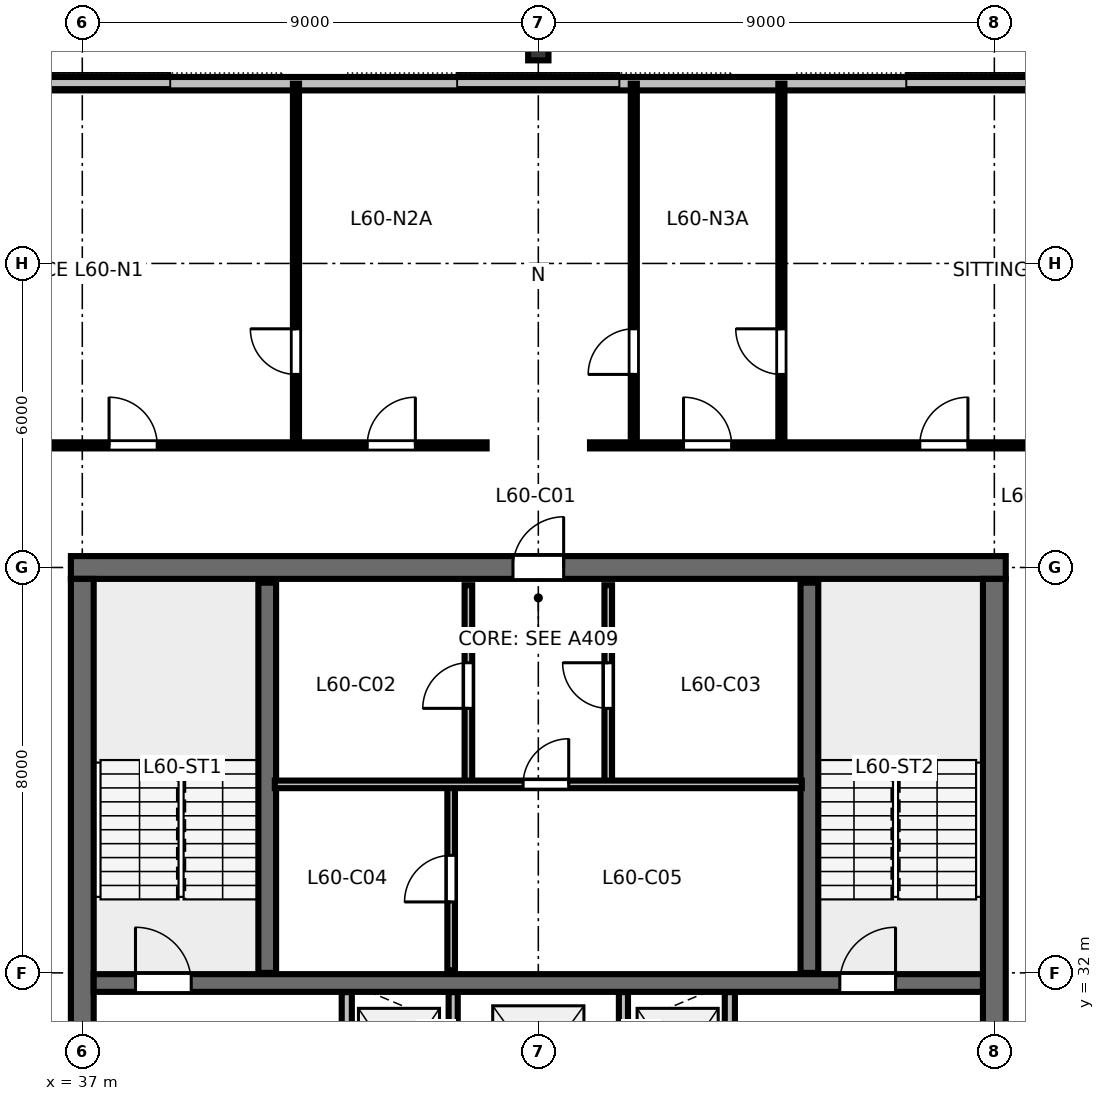
"""IFC4 building model, lengths in metres.
Left out: names, types, materials, properties, quantities, classifications, styles, units other than length and angle.
Written with IfcOpenShell. Run it as: python <this file> out.ifc"""

import sys

from ifc_helpers import new_model, si_unit, direction, frame, frame_2d, origin, origin_2d, place, context, subcontext, project, spatial, rectangle, i_section, extrude, element, fill, save


model = new_model("IFC4")
c1 = context("Model", 3, precision=1e-05, world=origin(), true_north=direction((0.0, 1.0)))
c2 = subcontext(c1, "Body", "Model", "MODEL_VIEW")
j1 = project(units=[si_unit("LENGTHUNIT", "METRE"), si_unit("PLANEANGLEUNIT", "RADIAN")], contexts=[c1])
p1 = place(None, origin())
s1 = spatial("IfcSite", under=j1, at=p1, CompositionType="ELEMENT")
p2 = place(p1, origin())
s2 = spatial("IfcBuilding", under=s1, at=p2, CompositionType="ELEMENT")
p3 = place(p2, frame((0.0, 0.0, 227.4)))
s3 = spatial("IfcBuildingStorey", under=s2, at=p3, CompositionType="ELEMENT", Elevation=227.4)
p4 = place(p3, frame((36.775, 40.0, 0.0), z_axis=(0.0, 0.0, 1.0), x_axis=(1.0, 0.0, 0.0)))
e1 = element("IfcWall", 1, at=p4, inside=s3, PredefinedType="SHEAR", context=c2, shape_type="SweptSolid", body=[
    extrude(rectangle(XDim=18.45, YDim=0.45, at=frame_2d((9.225, 0.0))), origin(), (0.0, 0.0, 1.0), 3.36),
])
p5 = place(p4, frame((8.725, 0.0, 0.0)))
e2 = element("IfcOpeningElement", 2, at=p5, cuts=e1, PredefinedType="OPENING", context=c2, shape_type="SweptSolid", body=[
    extrude(rectangle(XDim=1.0, YDim=2.15, at=frame_2d((0.5, 1.075))), frame((0.0, 0.235, 0.0), z_axis=(0.0, -1.0, 0.0), x_axis=(1.0, 0.0, 0.0)), (0.0, 0.0, 1.0), 0.47),
])
p6 = place(p3, frame((37.0, 24.225, 0.0), z_axis=(0.0, 0.0, 1.0), x_axis=(0.0, 1.0, 0.0)))
e3 = element("IfcWall", 3, at=p6, inside=s3, PredefinedType="SHEAR", context=c2, shape_type="SweptSolid", body=[
    extrude(rectangle(XDim=15.55, YDim=0.45, at=frame_2d((7.775, 0.0))), origin(), (0.0, 0.0, 1.0), 3.36),
])
p7 = place(p6, frame((5.3, 0.0, 0.0)))
e4 = element("IfcOpeningElement", 4, at=p7, cuts=e3, PredefinedType="OPENING", context=c2, shape_type="SweptSolid", body=[
    extrude(rectangle(XDim=1.15, YDim=2.15, at=frame_2d((0.575, 1.075))), frame((0.0, 0.235, 0.0), z_axis=(0.0, -1.0, 0.0), x_axis=(1.0, 0.0, 0.0)), (0.0, 0.0, 1.0), 0.47),
])
p8 = place(p3, frame((55.0, 24.225, 0.0), z_axis=(0.0, 0.0, 1.0), x_axis=(0.0, 1.0, 0.0)))
e5 = element("IfcWall", 5, at=p8, inside=s3, PredefinedType="SHEAR", context=c2, shape_type="SweptSolid", body=[
    extrude(rectangle(XDim=15.55, YDim=0.45, at=frame_2d((7.775, 0.0))), origin(), (0.0, 0.0, 1.0), 3.36),
])
p9 = place(p8, frame((5.3, 0.0, 0.0)))
e6 = element("IfcOpeningElement", 6, at=p9, cuts=e5, PredefinedType="OPENING", context=c2, shape_type="SweptSolid", body=[
    extrude(rectangle(XDim=1.15, YDim=2.15, at=frame_2d((0.575, 1.075))), frame((0.0, 0.235, 0.0), z_axis=(0.0, -1.0, 0.0), x_axis=(1.0, 0.0, 0.0)), (0.0, 0.0, 1.0), 0.47),
])
p10 = place(p3, frame((37.225, 31.8, 0.0), z_axis=(0.0, 0.0, 1.0), x_axis=(1.0, 0.0, 0.0)))
e7 = element("IfcWall", 7, at=p10, inside=s3, PredefinedType="SHEAR", context=c2, shape_type="SweptSolid", body=[
    extrude(rectangle(XDim=17.55, YDim=0.35, at=frame_2d((8.775, 0.0))), origin(), (0.0, 0.0, 1.0), 3.36),
])
p11 = place(p10, frame((0.825, 0.0, 0.0)))
e8 = element("IfcOpeningElement", 8, at=p11, cuts=e7, PredefinedType="OPENING", context=c2, shape_type="SweptSolid", body=[
    extrude(rectangle(XDim=1.1, YDim=2.15, at=frame_2d((0.55, 1.075))), frame((0.0, 0.185, 0.0), z_axis=(0.0, -1.0, 0.0), x_axis=(1.0, 0.0, 0.0)), (0.0, 0.0, 1.0), 0.37),
])
p12 = place(p10, frame((14.725, 0.0, 0.0)))
e9 = element("IfcOpeningElement", 9, at=p12, cuts=e7, PredefinedType="OPENING", context=c2, shape_type="SweptSolid", body=[
    extrude(rectangle(XDim=1.1, YDim=2.15, at=frame_2d((0.55, 1.075))), frame((0.0, 0.185, 0.0), z_axis=(0.0, -1.0, 0.0), x_axis=(1.0, 0.0, 0.0)), (0.0, 0.0, 1.0), 0.37),
])
p13 = place(p3, frame((46.0, 50.207, 0.0), z_axis=(0.0, -0.128274255688, 0.991738733401), x_axis=(1.0, 0.0, 0.0)))
e10 = element("IfcColumn", 10, at=p13, inside=s3, PredefinedType="COLUMN", context=c2, shape_type="SweptSolid", body=[
    extrude(i_section(OverallWidth=0.401, OverallDepth=0.399, WebThickness=0.025, FlangeThickness=0.04, FilletRadius=0.025, at=origin_2d()), origin(), (0.0, 0.0, 1.0), 3.401),
])
p14 = place(p3, frame((60.195, 49.547, 0.0), z_axis=(0.0, 0.0, 1.0), x_axis=(-1.0, 0.0, 0.0)))
e11 = element("IfcWall", 11, at=p14, inside=s3, PredefinedType="STANDARD", context=c2, shape_type="SweptSolid", body=[
    extrude(rectangle(XDim=28.389, YDim=0.265, at=frame_2d((14.195, 0.0))), origin(), (0.0, 0.0, 1.0), 2.832),
])
for number, where, z_axis, x_axis in (
    (12, (40.65, 32.0, 0.0), (0.0, 0.0, 1.0), (0.0, 1.0, 0.0)),
    (13, (51.35, 32.0, 0.0), (0.0, 0.0, 1.0), (0.0, 1.0, 0.0)),
):
    element("IfcWall", number, at=place(p3, frame(where, z_axis=z_axis, x_axis=x_axis)), inside=s3, PredefinedType="SHEAR", context=c2, shape_type="SweptSolid", body=[
        extrude(rectangle(XDim=7.7, YDim=0.35, at=frame_2d((3.85, 0.0))), origin(), (0.0, 0.0, 1.0), 3.6),
    ])
p15 = place(p3, frame((44.62, 35.72, 0.0), z_axis=(0.0, 0.0, 1.0), x_axis=(0.0, 1.0, 0.0)))
e14 = element("IfcWall", 14, at=p15, inside=s3, PredefinedType="PARTITIONING", context=c2, shape_type="SweptSolid", body=[
    extrude(rectangle(XDim=3.93, YDim=0.15, at=frame_2d((1.965, 0.0))), origin(), (0.0, 0.0, 1.0), 3.375),
])
p16 = place(p15, frame((1.5, 0.0, 0.0)))
e15 = element("IfcOpeningElement", 15, at=p16, cuts=e14, PredefinedType="OPENING", context=c2, shape_type="SweptSolid", body=[
    extrude(rectangle(XDim=0.9, YDim=2.15, at=frame_2d((0.45, 1.075))), frame((0.0, 0.085, 0.0), z_axis=(0.0, -1.0, 0.0), x_axis=(1.0, 0.0, 0.0)), (0.0, 0.0, 1.0), 0.17),
])
p17 = place(p3, frame((47.38, 35.72, 0.0), z_axis=(0.0, 0.0, 1.0), x_axis=(0.0, 1.0, 0.0)))
e16 = element("IfcWall", 16, at=p17, inside=s3, PredefinedType="PARTITIONING", context=c2, shape_type="SweptSolid", body=[
    extrude(rectangle(XDim=3.93, YDim=0.15, at=frame_2d((1.965, 0.0))), origin(), (0.0, 0.0, 1.0), 3.375),
])
p18 = place(p17, frame((1.5, 0.0, 0.0)))
e17 = element("IfcOpeningElement", 17, at=p18, cuts=e16, PredefinedType="OPENING", context=c2, shape_type="SweptSolid", body=[
    extrude(rectangle(XDim=0.9, YDim=2.15, at=frame_2d((0.45, 1.075))), frame((0.0, 0.085, 0.0), z_axis=(0.0, -1.0, 0.0), x_axis=(1.0, 0.0, 0.0)), (0.0, 0.0, 1.0), 0.17),
])
p19 = place(p3, frame((44.28, 32.05, 0.0), z_axis=(0.0, 0.0, 1.0), x_axis=(0.0, 1.0, 0.0)))
e18 = element("IfcWall", 18, at=p19, inside=s3, PredefinedType="PARTITIONING", context=c2, shape_type="SweptSolid", body=[
    extrude(rectangle(XDim=3.67, YDim=0.15, at=frame_2d((1.835, 0.0))), origin(), (0.0, 0.0, 1.0), 3.375),
])
p20 = place(p19, frame((1.35, 0.0, 0.0)))
e19 = element("IfcOpeningElement", 19, at=p20, cuts=e18, PredefinedType="OPENING", context=c2, shape_type="SweptSolid", body=[
    extrude(rectangle(XDim=0.92, YDim=2.15, at=frame_2d((0.46, 1.075))), frame((0.0, 0.085, 0.0), z_axis=(0.0, -1.0, 0.0), x_axis=(1.0, 0.0, 0.0)), (0.0, 0.0, 1.0), 0.17),
])
p21 = place(p3, frame((40.8, 35.72, 0.0), z_axis=(0.0, 0.0, 1.0), x_axis=(1.0, 0.0, 0.0)))
e20 = element("IfcWall", 20, at=p21, inside=s3, PredefinedType="PARTITIONING", context=c2, shape_type="SweptSolid", body=[
    extrude(rectangle(XDim=10.4, YDim=0.15, at=frame_2d((5.2, 0.0))), origin(), (0.0, 0.0, 1.0), 3.375),
])
p22 = place(p21, frame((4.9, 0.0, 0.0)))
e21 = element("IfcOpeningElement", 21, at=p22, cuts=e20, PredefinedType="OPENING", context=c2, shape_type="SweptSolid", body=[
    extrude(rectangle(XDim=0.9, YDim=2.15, at=frame_2d((0.45, 1.075))), frame((0.0, 0.085, 0.0), z_axis=(0.0, -1.0, 0.0), x_axis=(1.0, 0.0, 0.0)), (0.0, 0.0, 1.0), 0.17),
])
p23 = place(p3, frame((42.22, 28.58, 0.0), z_axis=(0.0, 0.0, 1.0), x_axis=(0.0, 1.0, 0.0)))
e22 = element("IfcWall", 22, at=p23, inside=s3, PredefinedType="PARTITIONING", context=c2, shape_type="SweptSolid", body=[
    extrude(rectangle(XDim=3.04, YDim=0.2, at=frame_2d((1.52, 0.0))), origin(), (0.0, 0.0, 1.0), 3.375),
])
p24 = place(p23, frame((0.95, 0.0, 0.0)))
e23 = element("IfcOpeningElement", 23, at=p24, cuts=e22, PredefinedType="OPENING", context=c2, shape_type="SweptSolid", body=[
    extrude(rectangle(XDim=1.05, YDim=2.15, at=frame_2d((0.525, 1.075))), frame((0.0, 0.11, 0.0), z_axis=(0.0, -1.0, 0.0), x_axis=(1.0, 0.0, 0.0)), (0.0, 0.0, 1.0), 0.22),
])
p25 = place(p3, frame((49.78, 28.58, 0.0), z_axis=(0.0, 0.0, 1.0), x_axis=(0.0, 1.0, 0.0)))
e24 = element("IfcWall", 24, at=p25, inside=s3, PredefinedType="PARTITIONING", context=c2, shape_type="SweptSolid", body=[
    extrude(rectangle(XDim=3.04, YDim=0.2, at=frame_2d((1.52, 0.0))), origin(), (0.0, 0.0, 1.0), 3.375),
])
p26 = place(p25, frame((0.95, 0.0, 0.0)))
e25 = element("IfcOpeningElement", 25, at=p26, cuts=e24, PredefinedType="OPENING", context=c2, shape_type="SweptSolid", body=[
    extrude(rectangle(XDim=1.05, YDim=2.15, at=frame_2d((0.525, 1.075))), frame((0.0, 0.11, 0.0), z_axis=(0.0, -1.0, 0.0), x_axis=(1.0, 0.0, 0.0)), (0.0, 0.0, 1.0), 0.22),
])
for number, where, z_axis, x_axis in (
    (26, (44.32, 28.58, 0.0), (0.0, 0.0, 1.0), (0.0, 1.0, 0.0)),
    (27, (47.68, 28.58, 0.0), (0.0, 0.0, 1.0), (0.0, 1.0, 0.0)),
):
    element("IfcWall", number, at=place(p3, frame(where, z_axis=z_axis, x_axis=x_axis)), inside=s3, PredefinedType="PARTITIONING", context=c2, shape_type="SweptSolid", body=[
        extrude(rectangle(XDim=3.04, YDim=0.18, at=frame_2d((1.52, 0.0))), origin(), (0.0, 0.0, 1.0), 3.375),
    ])
p27 = place(p3, frame((41.217, 42.41, 0.0), z_axis=(0.0, 0.0, 1.0), x_axis=(0.0, 1.0, 0.0)))
e28 = element("IfcWall", 28, at=p27, inside=s3, PredefinedType="PARTITIONING", context=c2, shape_type="SweptSolid", body=[
    extrude(rectangle(XDim=7.137, YDim=0.12, at=frame_2d((3.569, 0.0))), origin(), (0.0, 0.0, 1.0), 2.655),
])
p28 = place(p27, frame((1.4, 0.0, 0.0)))
e29 = element("IfcOpeningElement", 29, at=p28, cuts=e28, PredefinedType="OPENING", context=c2, shape_type="SweptSolid", body=[
    extrude(rectangle(XDim=0.9, YDim=2.15, at=frame_2d((0.45, 1.075))), frame((0.0, 0.07, 0.0), z_axis=(0.0, -1.0, 0.0), x_axis=(1.0, 0.0, 0.0)), (0.0, 0.0, 1.0), 0.14),
])
p29 = place(p3, frame((47.885, 42.41, 0.0), z_axis=(0.0, 0.0, 1.0), x_axis=(0.0, 1.0, 0.0)))
e30 = element("IfcWall", 30, at=p29, inside=s3, PredefinedType="PARTITIONING", context=c2, shape_type="SweptSolid", body=[
    extrude(rectangle(XDim=7.137, YDim=0.12, at=frame_2d((3.569, 0.0))), origin(), (0.0, 0.0, 1.0), 2.655),
])
p30 = place(p29, frame((1.4, 0.0, 0.0)))
e31 = element("IfcOpeningElement", 31, at=p30, cuts=e30, PredefinedType="OPENING", context=c2, shape_type="SweptSolid", body=[
    extrude(rectangle(XDim=0.9, YDim=2.15, at=frame_2d((0.45, 1.075))), frame((0.0, 0.07, 0.0), z_axis=(0.0, -1.0, 0.0), x_axis=(1.0, 0.0, 0.0)), (0.0, 0.0, 1.0), 0.14),
])
p31 = place(p3, frame((50.797, 42.41, 0.0), z_axis=(0.0, 0.0, 1.0), x_axis=(0.0, 1.0, 0.0)))
e32 = element("IfcWall", 32, at=p31, inside=s3, PredefinedType="PARTITIONING", context=c2, shape_type="SweptSolid", body=[
    extrude(rectangle(XDim=7.137, YDim=0.12, at=frame_2d((3.569, 0.0))), origin(), (0.0, 0.0, 1.0), 2.655),
])
p32 = place(p31, frame((1.4, 0.0, 0.0)))
e33 = element("IfcOpeningElement", 33, at=p32, cuts=e32, PredefinedType="OPENING", context=c2, shape_type="SweptSolid", body=[
    extrude(rectangle(XDim=0.9, YDim=2.15, at=frame_2d((0.45, 1.075))), frame((0.0, 0.07, 0.0), z_axis=(0.0, -1.0, 0.0), x_axis=(1.0, 0.0, 0.0)), (0.0, 0.0, 1.0), 0.14),
])
p33 = place(p3, frame((34.65, 42.41, 0.0), z_axis=(0.0, 0.0, 1.0), x_axis=(1.0, 0.0, 0.0)))
e34 = element("IfcWall", 34, at=p33, inside=s3, PredefinedType="PARTITIONING", context=c2, shape_type="SweptSolid", body=[
    extrude(rectangle(XDim=10.33, YDim=0.12, at=frame_2d((5.165, 0.0))), origin(), (0.0, 0.0, 1.0), 2.655),
])
p34 = place(p33, frame((2.878, 0.0, 0.0)))
e35 = element("IfcOpeningElement", 35, at=p34, cuts=e34, PredefinedType="OPENING", context=c2, shape_type="SweptSolid", body=[
    extrude(rectangle(XDim=0.95, YDim=2.15, at=frame_2d((0.475, 1.075))), frame((0.0, 0.07, 0.0), z_axis=(0.0, -1.0, 0.0), x_axis=(1.0, 0.0, 0.0)), (0.0, 0.0, 1.0), 0.14),
])
p35 = place(p33, frame((7.974, 0.0, 0.0)))
e36 = element("IfcOpeningElement", 36, at=p35, cuts=e34, PredefinedType="OPENING", context=c2, shape_type="SweptSolid", body=[
    extrude(rectangle(XDim=0.95, YDim=2.15, at=frame_2d((0.475, 1.075))), frame((0.0, 0.07, 0.0), z_axis=(0.0, -1.0, 0.0), x_axis=(1.0, 0.0, 0.0)), (0.0, 0.0, 1.0), 0.14),
])
p36 = place(p3, frame((47.02, 42.41, 0.0), z_axis=(0.0, 0.0, 1.0), x_axis=(1.0, 0.0, 0.0)))
e37 = element("IfcWall", 37, at=p36, inside=s3, PredefinedType="PARTITIONING", context=c2, shape_type="SweptSolid", body=[
    extrude(rectangle(XDim=10.33, YDim=0.12, at=frame_2d((5.165, 0.0))), origin(), (0.0, 0.0, 1.0), 2.655),
])
p37 = place(p36, frame((1.846, 0.0, 0.0)))
e38 = element("IfcOpeningElement", 38, at=p37, cuts=e37, PredefinedType="OPENING", context=c2, shape_type="SweptSolid", body=[
    extrude(rectangle(XDim=0.95, YDim=2.15, at=frame_2d((0.475, 1.075))), frame((0.0, 0.07, 0.0), z_axis=(0.0, -1.0, 0.0), x_axis=(1.0, 0.0, 0.0)), (0.0, 0.0, 1.0), 0.14),
])
p38 = place(p36, frame((6.509, 0.0, 0.0)))
e39 = element("IfcOpeningElement", 39, at=p38, cuts=e37, PredefinedType="OPENING", context=c2, shape_type="SweptSolid", body=[
    extrude(rectangle(XDim=0.95, YDim=2.15, at=frame_2d((0.475, 1.075))), frame((0.0, 0.07, 0.0), z_axis=(0.0, -1.0, 0.0), x_axis=(1.0, 0.0, 0.0)), (0.0, 0.0, 1.0), 0.14),
])
p39 = place(p11, origin())
e40 = element("IfcDoor", 40, at=p39, inside=s3, OperationType="SINGLE_SWING_LEFT", PredefinedType="DOOR", context=c2, shape_type="SweptSolid", body=[
    extrude(rectangle(XDim=1.1, YDim=2.15, at=frame_2d((0.55, 1.075))), frame((0.0, 0.025, 0.0), z_axis=(0.0, -1.0, 0.0), x_axis=(1.0, 0.0, 0.0)), (0.0, 0.0, 1.0), 0.05),
])
fill(e8, e40)
p40 = place(p12, origin())
e41 = element("IfcDoor", 41, at=p40, inside=s3, OperationType="SINGLE_SWING_RIGHT", PredefinedType="DOOR", context=c2, shape_type="SweptSolid", body=[
    extrude(rectangle(XDim=1.1, YDim=2.15, at=frame_2d((0.55, 1.075))), frame((0.0, 0.025, 0.0), z_axis=(0.0, -1.0, 0.0), x_axis=(1.0, 0.0, 0.0)), (0.0, 0.0, 1.0), 0.05),
])
fill(e9, e41)
p41 = place(p5, origin())
e42 = element("IfcDoor", 42, at=p41, inside=s3, OperationType="SINGLE_SWING_RIGHT", PredefinedType="DOOR", context=c2, shape_type="SweptSolid", body=[
    extrude(rectangle(XDim=1.0, YDim=2.15, at=frame_2d((0.5, 1.075))), frame((0.0, 0.025, 0.0), z_axis=(0.0, -1.0, 0.0), x_axis=(1.0, 0.0, 0.0)), (0.0, 0.0, 1.0), 0.05),
])
fill(e2, e42)
p42 = place(p16, origin())
e43 = element("IfcDoor", 43, at=p42, inside=s3, OperationType="SINGLE_SWING_LEFT", PredefinedType="DOOR", context=c2, shape_type="SweptSolid", body=[
    extrude(rectangle(XDim=0.9, YDim=2.15, at=frame_2d((0.45, 1.075))), frame((0.0, 0.025, 0.0), z_axis=(0.0, -1.0, 0.0), x_axis=(1.0, 0.0, 0.0)), (0.0, 0.0, 1.0), 0.05),
])
fill(e15, e43)
p43 = place(p18, origin())
e44 = element("IfcDoor", 44, at=p43, inside=s3, OperationType="SINGLE_SWING_RIGHT", PredefinedType="DOOR", context=c2, shape_type="SweptSolid", body=[
    extrude(rectangle(XDim=0.9, YDim=2.15, at=frame_2d((0.45, 1.075))), frame((0.0, 0.025, 0.0), z_axis=(0.0, -1.0, 0.0), x_axis=(1.0, 0.0, 0.0)), (0.0, 0.0, 1.0), 0.05),
])
fill(e17, e44)
p44 = place(p20, origin())
e45 = element("IfcDoor", 45, at=p44, inside=s3, OperationType="SINGLE_SWING_LEFT", PredefinedType="DOOR", context=c2, shape_type="SweptSolid", body=[
    extrude(rectangle(XDim=0.92, YDim=2.15, at=frame_2d((0.46, 1.075))), frame((0.0, 0.025, 0.0), z_axis=(0.0, -1.0, 0.0), x_axis=(1.0, 0.0, 0.0)), (0.0, 0.0, 1.0), 0.05),
])
fill(e19, e45)
p45 = place(p22, origin())
e46 = element("IfcDoor", 46, at=p45, inside=s3, OperationType="SINGLE_SWING_RIGHT", PredefinedType="DOOR", context=c2, shape_type="SweptSolid", body=[
    extrude(rectangle(XDim=0.9, YDim=2.15, at=frame_2d((0.45, 1.075))), frame((0.0, 0.025, 0.0), z_axis=(0.0, -1.0, 0.0), x_axis=(1.0, 0.0, 0.0)), (0.0, 0.0, 1.0), 0.05),
])
fill(e21, e46)
p46 = place(p28, origin())
e47 = element("IfcDoor", 47, at=p46, inside=s3, OperationType="SINGLE_SWING_RIGHT", PredefinedType="DOOR", context=c2, shape_type="SweptSolid", body=[
    extrude(rectangle(XDim=0.9, YDim=2.15, at=frame_2d((0.45, 1.075))), frame((0.0, 0.025, 0.0), z_axis=(0.0, -1.0, 0.0), x_axis=(1.0, 0.0, 0.0)), (0.0, 0.0, 1.0), 0.05),
])
fill(e29, e47)
p47 = place(p30, origin())
e48 = element("IfcDoor", 48, at=p47, inside=s3, OperationType="SINGLE_SWING_LEFT", PredefinedType="DOOR", context=c2, shape_type="SweptSolid", body=[
    extrude(rectangle(XDim=0.9, YDim=2.15, at=frame_2d((0.45, 1.075))), frame((0.0, 0.025, 0.0), z_axis=(0.0, -1.0, 0.0), x_axis=(1.0, 0.0, 0.0)), (0.0, 0.0, 1.0), 0.05),
])
fill(e31, e48)
p48 = place(p32, origin())
e49 = element("IfcDoor", 49, at=p48, inside=s3, OperationType="SINGLE_SWING_RIGHT", PredefinedType="DOOR", context=c2, shape_type="SweptSolid", body=[
    extrude(rectangle(XDim=0.9, YDim=2.15, at=frame_2d((0.45, 1.075))), frame((0.0, 0.025, 0.0), z_axis=(0.0, -1.0, 0.0), x_axis=(1.0, 0.0, 0.0)), (0.0, 0.0, 1.0), 0.05),
])
fill(e33, e49)
p49 = place(p34, origin())
e50 = element("IfcDoor", 50, at=p49, inside=s3, OperationType="SINGLE_SWING_LEFT", PredefinedType="DOOR", context=c2, shape_type="SweptSolid", body=[
    extrude(rectangle(XDim=0.95, YDim=2.15, at=frame_2d((0.475, 1.075))), frame((0.0, 0.025, 0.0), z_axis=(0.0, -1.0, 0.0), x_axis=(1.0, 0.0, 0.0)), (0.0, 0.0, 1.0), 0.05),
])
fill(e35, e50)
p50 = place(p35, origin())
e51 = element("IfcDoor", 51, at=p50, inside=s3, OperationType="SINGLE_SWING_RIGHT", PredefinedType="DOOR", context=c2, shape_type="SweptSolid", body=[
    extrude(rectangle(XDim=0.95, YDim=2.15, at=frame_2d((0.475, 1.075))), frame((0.0, 0.025, 0.0), z_axis=(0.0, -1.0, 0.0), x_axis=(1.0, 0.0, 0.0)), (0.0, 0.0, 1.0), 0.05),
])
fill(e36, e51)
p51 = place(p37, origin())
e52 = element("IfcDoor", 52, at=p51, inside=s3, OperationType="SINGLE_SWING_LEFT", PredefinedType="DOOR", context=c2, shape_type="SweptSolid", body=[
    extrude(rectangle(XDim=0.95, YDim=2.15, at=frame_2d((0.475, 1.075))), frame((0.0, 0.025, 0.0), z_axis=(0.0, -1.0, 0.0), x_axis=(1.0, 0.0, 0.0)), (0.0, 0.0, 1.0), 0.05),
])
fill(e38, e52)
p52 = place(p38, origin())
e53 = element("IfcDoor", 53, at=p52, inside=s3, OperationType="SINGLE_SWING_RIGHT", PredefinedType="DOOR", context=c2, shape_type="SweptSolid", body=[
    extrude(rectangle(XDim=0.95, YDim=2.15, at=frame_2d((0.475, 1.075))), frame((0.0, 0.025, 0.0), z_axis=(0.0, -1.0, 0.0), x_axis=(1.0, 0.0, 0.0)), (0.0, 0.0, 1.0), 0.05),
])
fill(e39, e53)
save(model, sys.argv[1])
